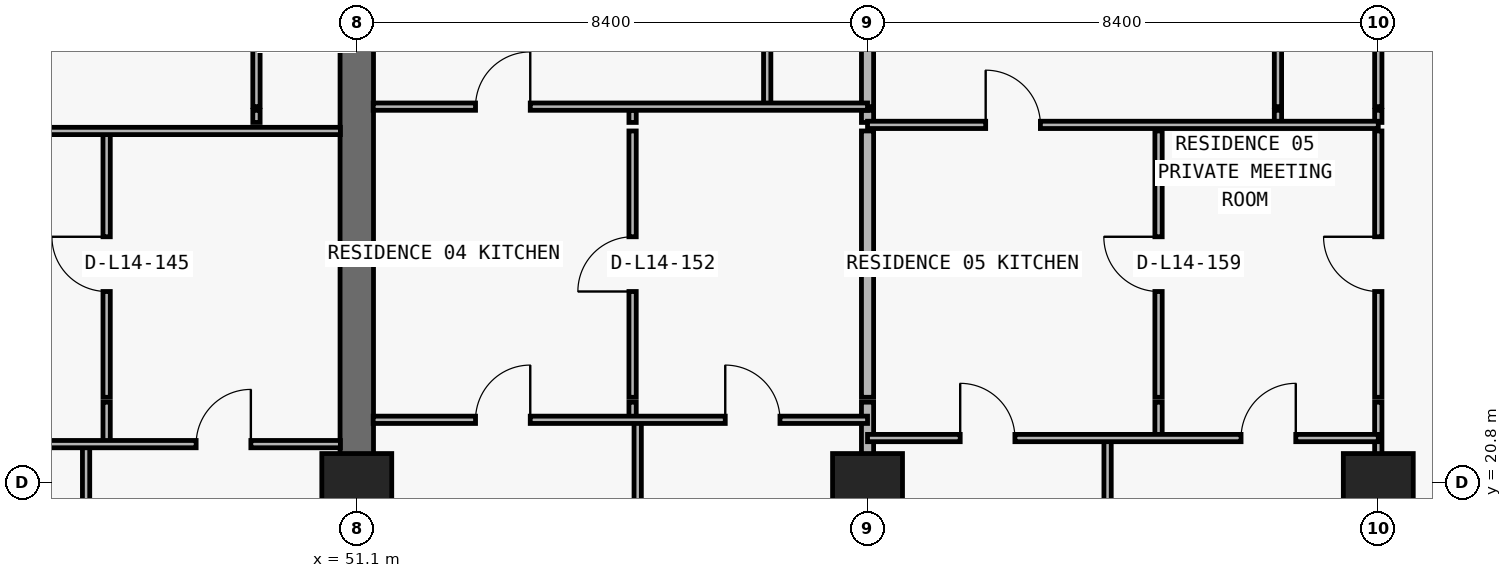
"""IFC4 building model, lengths in metres.
Left out: names, types, materials, properties, quantities, classifications, styles, units other than length and angle.
Written with IfcOpenShell. Run it as: python <this file> out.ifc"""

import sys

from ifc_helpers import new_model, si_unit, direction, frame, frame_2d, origin, origin_2d, place, context, subcontext, project, spatial, rectangle, extrude, element, fill, save


model = new_model("IFC4")
c1 = context("Model", 3, precision=1e-05, world=origin(), true_north=direction((0.0, 1.0)))
c2 = subcontext(c1, "Body", "Model", "MODEL_VIEW")
j1 = project(units=[si_unit("LENGTHUNIT", "METRE"), si_unit("PLANEANGLEUNIT", "RADIAN")], contexts=[c1])
p1 = place(None, origin())
s1 = spatial("IfcSite", under=j1, at=p1, CompositionType="ELEMENT")
p2 = place(p1, origin())
s2 = spatial("IfcBuilding", under=s1, at=p2, CompositionType="ELEMENT")
p3 = place(p2, frame((0.0, 0.0, 56.4)))
s3 = spatial("IfcBuildingStorey", under=s2, at=p3, CompositionType="ELEMENT", Elevation=56.4)
for number, where, z_axis, x_axis in (
    (1, (51.1, 20.8, 0.0), (0.0, 0.0, 1.0), (1.0, 0.0, 0.0)),
    (2, (59.5, 20.8, 0.0), (0.0, 0.0, 1.0), (1.0, 0.0, 0.0)),
    (3, (67.9, 20.8, 0.0), (0.0, 0.0, 1.0), (1.0, 0.0, 0.0)),
):
    element("IfcColumn", number, at=place(p3, frame(where, z_axis=z_axis, x_axis=x_axis)), inside=s3, PredefinedType="COLUMN", context=c2, shape_type="SweptSolid", body=[
        extrude(rectangle(XDim=1.15, YDim=0.95, at=origin_2d()), origin(), (0.0, 0.0, 1.0), 3.05),
    ])
p4 = place(p3, frame((51.1, 20.8, 0.0), z_axis=(0.0, 0.0, 1.0), x_axis=(0.0, 1.0, 0.0)))
e4 = element("IfcWall", 4, at=p4, inside=s3, PredefinedType="SHEAR", context=c2, shape_type="SweptSolid", body=[
    extrude(rectangle(XDim=8.6, YDim=0.55, at=frame_2d((4.3, 0.0))), origin(), (0.0, 0.0, 1.0), 3.05),
])
p5 = place(p3, frame((46.648, 6.24, 0.0), z_axis=(0.0, 0.0, 1.0), x_axis=(0.0, 1.0, 0.0)))
e5 = element("IfcWall", 5, at=p5, inside=s3, PredefinedType="PARTITIONING", context=c2, shape_type="SweptSolid", body=[
    extrude(rectangle(XDim=15.19, YDim=0.12, at=frame_2d((7.595, 0.0))), origin(), (0.0, 0.0, 1.0), 3.05),
])
p6 = place(p3, frame((46.986, 21.43, 0.0), z_axis=(0.0, 0.0, 1.0), x_axis=(0.0, 1.0, 0.0)))
e6 = element("IfcWall", 6, at=p6, inside=s3, PredefinedType="PARTITIONING", context=c2, shape_type="SweptSolid", body=[
    extrude(rectangle(XDim=0.69, YDim=0.12, at=frame_2d((0.345, 0.0))), origin(), (0.0, 0.0, 1.0), 3.05),
])
p7 = place(p3, frame((46.986, 22.2, 0.0), z_axis=(0.0, 0.0, 1.0), x_axis=(0.0, 1.0, 0.0)))
e7 = element("IfcWall", 7, at=p7, inside=s3, PredefinedType="PARTITIONING", context=c2, shape_type="SweptSolid", body=[
    extrude(rectangle(XDim=4.38, YDim=0.12, at=frame_2d((2.19, 0.0))), origin(), (0.0, 0.0, 1.0), 3.05),
])
p8 = place(p7, frame((1.74, 0.0, 0.0)))
e8 = element("IfcOpeningElement", 8, at=p8, cuts=e7, PredefinedType="OPENING", context=c2, shape_type="SweptSolid", body=[
    extrude(rectangle(XDim=0.9, YDim=2.15, at=frame_2d((0.45, 1.075))), frame((0.0, 0.07, 0.0), z_axis=(0.0, -1.0, 0.0), x_axis=(1.0, 0.0, 0.0)), (0.0, 0.0, 1.0), 0.14),
])
p9 = place(p3, frame((49.45, 26.72, 0.0), z_axis=(0.0, 0.0, 1.0), x_axis=(0.0, 1.0, 0.0)))
e9 = element("IfcWall", 9, at=p9, inside=s3, PredefinedType="PARTITIONING", context=c2, shape_type="SweptSolid", body=[
    extrude(rectangle(XDim=0.2, YDim=0.12, at=frame_2d((0.1, 0.0))), origin(), (0.0, 0.0, 1.0), 3.05),
])
p10 = place(p3, frame((49.45, 26.98, 0.0), z_axis=(0.0, 0.0, 1.0), x_axis=(0.0, 1.0, 0.0)))
e10 = element("IfcWall", 10, at=p10, inside=s3, PredefinedType="PARTITIONING", context=c2, shape_type="SweptSolid", body=[
    extrude(rectangle(XDim=6.82, YDim=0.12, at=frame_2d((3.41, 0.0))), origin(), (0.0, 0.0, 1.0), 3.05),
])
p11 = place(p10, frame((3.435, 0.0, 0.0)))
e11 = element("IfcOpeningElement", 11, at=p11, cuts=e10, PredefinedType="OPENING", context=c2, shape_type="SweptSolid", body=[
    extrude(rectangle(XDim=0.85, YDim=2.1, at=frame_2d((0.425, 1.05))), frame((0.0, 0.07, 0.0), z_axis=(0.0, -1.0, 0.0), x_axis=(1.0, 0.0, 0.0)), (0.0, 0.0, 1.0), 0.14),
])
p12 = place(p3, frame((51.1, 6.24, 0.0), z_axis=(0.0, 0.0, 1.0), x_axis=(0.0, 1.0, 0.0)))
e12 = element("IfcWall", 12, at=p12, inside=s3, PredefinedType="PARTITIONING", context=c2, shape_type="SweptSolid", body=[
    extrude(rectangle(XDim=14.555, YDim=0.2, at=frame_2d((7.277, 0.0))), origin(), (0.0, 0.0, 1.0), 2.11),
])
p13 = place(p3, frame((55.636, 21.83, 0.0), z_axis=(0.0, 0.0, 1.0), x_axis=(0.0, 1.0, 0.0)))
e13 = element("IfcWall", 13, at=p13, inside=s3, PredefinedType="PARTITIONING", context=c2, shape_type="SweptSolid", body=[
    extrude(rectangle(XDim=0.29, YDim=0.12, at=frame_2d((0.145, 0.0))), origin(), (0.0, 0.0, 1.0), 3.05),
])
p14 = place(p3, frame((55.636, 22.2, 0.0), z_axis=(0.0, 0.0, 1.0), x_axis=(0.0, 1.0, 0.0)))
e14 = element("IfcWall", 14, at=p14, inside=s3, PredefinedType="PARTITIONING", context=c2, shape_type="SweptSolid", body=[
    extrude(rectangle(XDim=4.38, YDim=0.12, at=frame_2d((2.19, 0.0))), origin(), (0.0, 0.0, 1.0), 3.05),
])
p15 = place(p14, frame((1.74, 0.0, 0.0)))
e15 = element("IfcOpeningElement", 15, at=p15, cuts=e14, PredefinedType="OPENING", context=c2, shape_type="SweptSolid", body=[
    extrude(rectangle(XDim=0.9, YDim=2.15, at=frame_2d((0.45, 1.075))), frame((0.0, 0.07, 0.0), z_axis=(0.0, -1.0, 0.0), x_axis=(1.0, 0.0, 0.0)), (0.0, 0.0, 1.0), 0.14),
])
p16 = place(p3, frame((55.636, 26.72, 0.0), z_axis=(0.0, 0.0, 1.0), x_axis=(0.0, 1.0, 0.0)))
e16 = element("IfcWall", 16, at=p16, inside=s3, PredefinedType="PARTITIONING", context=c2, shape_type="SweptSolid", body=[
    extrude(rectangle(XDim=0.2, YDim=0.12, at=frame_2d((0.1, 0.0))), origin(), (0.0, 0.0, 1.0), 3.05),
])
p17 = place(p3, frame((55.72, 6.24, 0.0), z_axis=(0.0, 0.0, 1.0), x_axis=(0.0, 1.0, 0.0)))
e17 = element("IfcWall", 17, at=p17, inside=s3, PredefinedType="PARTITIONING", context=c2, shape_type="SweptSolid", body=[
    extrude(rectangle(XDim=15.585, YDim=0.12, at=frame_2d((7.792, 0.0))), origin(), (0.0, 0.0, 1.0), 3.05),
])
p18 = place(p3, frame((57.85, 26.98, 0.0), z_axis=(0.0, 0.0, 1.0), x_axis=(0.0, 1.0, 0.0)))
e18 = element("IfcWall", 18, at=p18, inside=s3, PredefinedType="PARTITIONING", context=c2, shape_type="SweptSolid", body=[
    extrude(rectangle(XDim=6.82, YDim=0.12, at=frame_2d((3.41, 0.0))), origin(), (0.0, 0.0, 1.0), 3.05),
])
p19 = place(p18, frame((3.435, 0.0, 0.0)))
e19 = element("IfcOpeningElement", 19, at=p19, cuts=e18, PredefinedType="OPENING", context=c2, shape_type="SweptSolid", body=[
    extrude(rectangle(XDim=0.85, YDim=2.1, at=frame_2d((0.425, 1.05))), frame((0.0, 0.07, 0.0), z_axis=(0.0, -1.0, 0.0), x_axis=(1.0, 0.0, 0.0)), (0.0, 0.0, 1.0), 0.14),
])
p20 = place(p3, frame((59.5, 6.24, 0.0), z_axis=(0.0, 0.0, 1.0), x_axis=(0.0, 1.0, 0.0)))
e20 = element("IfcWall", 20, at=p20, inside=s3, PredefinedType="PARTITIONING", context=c2, shape_type="SweptSolid", body=[
    extrude(rectangle(XDim=15.88, YDim=0.2, at=frame_2d((7.94, 0.0))), origin(), (0.0, 0.0, 1.0), 2.11),
])
p21 = place(p3, frame((59.5, 22.2, 0.0), z_axis=(0.0, 0.0, 1.0), x_axis=(0.0, 1.0, 0.0)))
e21 = element("IfcWall", 21, at=p21, inside=s3, PredefinedType="PARTITIONING", context=c2, shape_type="SweptSolid", body=[
    extrude(rectangle(XDim=4.38, YDim=0.2, at=frame_2d((2.19, 0.0))), origin(), (0.0, 0.0, 1.0), 2.11),
])
p22 = place(p3, frame((59.5, 26.72, 0.0), z_axis=(0.0, 0.0, 1.0), x_axis=(0.0, 1.0, 0.0)))
e22 = element("IfcWall", 22, at=p22, inside=s3, PredefinedType="PARTITIONING", context=c2, shape_type="SweptSolid", body=[
    extrude(rectangle(XDim=0.2, YDim=0.2, at=frame_2d((0.1, 0.0))), origin(), (0.0, 0.0, 1.0), 2.11),
])
p23 = place(p3, frame((59.5, 26.98, 0.0), z_axis=(0.0, 0.0, 1.0), x_axis=(0.0, 1.0, 0.0)))
e23 = element("IfcWall", 23, at=p23, inside=s3, PredefinedType="PARTITIONING", context=c2, shape_type="SweptSolid", body=[
    extrude(rectangle(XDim=6.82, YDim=0.2, at=frame_2d((3.41, 0.0))), origin(), (0.0, 0.0, 1.0), 2.11),
])
p24 = place(p3, frame((63.448, 6.24, 0.0), z_axis=(0.0, 0.0, 1.0), x_axis=(0.0, 1.0, 0.0)))
e24 = element("IfcWall", 24, at=p24, inside=s3, PredefinedType="PARTITIONING", context=c2, shape_type="SweptSolid", body=[
    extrude(rectangle(XDim=15.29, YDim=0.12, at=frame_2d((7.645, 0.0))), origin(), (0.0, 0.0, 1.0), 3.05),
])
p25 = place(p3, frame((64.286, 21.53, 0.0), z_axis=(0.0, 0.0, 1.0), x_axis=(0.0, 1.0, 0.0)))
e25 = element("IfcWall", 25, at=p25, inside=s3, PredefinedType="PARTITIONING", context=c2, shape_type="SweptSolid", body=[
    extrude(rectangle(XDim=0.59, YDim=0.12, at=frame_2d((0.295, 0.0))), origin(), (0.0, 0.0, 1.0), 3.05),
])
p26 = place(p3, frame((64.286, 22.2, 0.0), z_axis=(0.0, 0.0, 1.0), x_axis=(0.0, 1.0, 0.0)))
e26 = element("IfcWall", 26, at=p26, inside=s3, PredefinedType="PARTITIONING", context=c2, shape_type="SweptSolid", body=[
    extrude(rectangle(XDim=4.38, YDim=0.12, at=frame_2d((2.19, 0.0))), origin(), (0.0, 0.0, 1.0), 3.05),
])
p27 = place(p26, frame((1.74, 0.0, 0.0)))
e27 = element("IfcOpeningElement", 27, at=p27, cuts=e26, PredefinedType="OPENING", context=c2, shape_type="SweptSolid", body=[
    extrude(rectangle(XDim=0.9, YDim=2.15, at=frame_2d((0.45, 1.075))), frame((0.0, 0.07, 0.0), z_axis=(0.0, -1.0, 0.0), x_axis=(1.0, 0.0, 0.0)), (0.0, 0.0, 1.0), 0.14),
])
p28 = place(p3, frame((66.25, 26.72, 0.0), z_axis=(0.0, 0.0, 1.0), x_axis=(0.0, 1.0, 0.0)))
e28 = element("IfcWall", 28, at=p28, inside=s3, PredefinedType="PARTITIONING", context=c2, shape_type="SweptSolid", body=[
    extrude(rectangle(XDim=0.2, YDim=0.12, at=frame_2d((0.1, 0.0))), origin(), (0.0, 0.0, 1.0), 3.05),
])
p29 = place(p3, frame((66.25, 26.98, 0.0), z_axis=(0.0, 0.0, 1.0), x_axis=(0.0, 1.0, 0.0)))
e29 = element("IfcWall", 29, at=p29, inside=s3, PredefinedType="PARTITIONING", context=c2, shape_type="SweptSolid", body=[
    extrude(rectangle(XDim=6.82, YDim=0.12, at=frame_2d((3.41, 0.0))), origin(), (0.0, 0.0, 1.0), 3.05),
])
p30 = place(p29, frame((3.435, 0.0, 0.0)))
e30 = element("IfcOpeningElement", 30, at=p30, cuts=e29, PredefinedType="OPENING", context=c2, shape_type="SweptSolid", body=[
    extrude(rectangle(XDim=0.85, YDim=2.1, at=frame_2d((0.425, 1.05))), frame((0.0, 0.07, 0.0), z_axis=(0.0, -1.0, 0.0), x_axis=(1.0, 0.0, 0.0)), (0.0, 0.0, 1.0), 0.14),
])
p31 = place(p3, frame((67.9, 6.24, 0.0), z_axis=(0.0, 0.0, 1.0), x_axis=(0.0, 1.0, 0.0)))
e31 = element("IfcWall", 31, at=p31, inside=s3, PredefinedType="PARTITIONING", context=c2, shape_type="SweptSolid", body=[
    extrude(rectangle(XDim=15.88, YDim=0.12, at=frame_2d((7.94, 0.0))), origin(), (0.0, 0.0, 1.0), 2.11),
])
p32 = place(p3, frame((67.9, 22.2, 0.0), z_axis=(0.0, 0.0, 1.0), x_axis=(0.0, 1.0, 0.0)))
e32 = element("IfcWall", 32, at=p32, inside=s3, PredefinedType="PARTITIONING", context=c2, shape_type="SweptSolid", body=[
    extrude(rectangle(XDim=4.38, YDim=0.12, at=frame_2d((2.19, 0.0))), origin(), (0.0, 0.0, 1.0), 2.11),
])
p33 = place(p32, frame((1.74, 0.0, 0.0)))
e33 = element("IfcOpeningElement", 33, at=p33, cuts=e32, PredefinedType="OPENING", context=c2, shape_type="SweptSolid", body=[
    extrude(rectangle(XDim=0.9, YDim=2.06, at=frame_2d((0.45, 1.03))), frame((0.0, 0.07, 0.0), z_axis=(0.0, -1.0, 0.0), x_axis=(1.0, 0.0, 0.0)), (0.0, 0.0, 1.0), 0.14),
])
p34 = place(p3, frame((67.9, 26.72, 0.0), z_axis=(0.0, 0.0, 1.0), x_axis=(0.0, 1.0, 0.0)))
e34 = element("IfcWall", 34, at=p34, inside=s3, PredefinedType="PARTITIONING", context=c2, shape_type="SweptSolid", body=[
    extrude(rectangle(XDim=0.2, YDim=0.12, at=frame_2d((0.1, 0.0))), origin(), (0.0, 0.0, 1.0), 2.11),
])
p35 = place(p3, frame((67.9, 26.98, 0.0), z_axis=(0.0, 0.0, 1.0), x_axis=(0.0, 1.0, 0.0)))
e35 = element("IfcWall", 35, at=p35, inside=s3, PredefinedType="PARTITIONING", context=c2, shape_type="SweptSolid", body=[
    extrude(rectangle(XDim=6.82, YDim=0.12, at=frame_2d((3.41, 0.0))), origin(), (0.0, 0.0, 1.0), 2.11),
])
p36 = place(p3, frame((42.7, 21.43, 0.0), z_axis=(0.0, 0.0, 1.0), x_axis=(1.0, 0.0, 0.0)))
e36 = element("IfcWall", 36, at=p36, inside=s3, PredefinedType="PARTITIONING", context=c2, shape_type="SweptSolid", body=[
    extrude(rectangle(XDim=8.13, YDim=0.12, at=frame_2d((4.065, 0.0))), origin(), (0.0, 0.0, 1.0), 3.05),
])
p37 = place(p36, frame((1.524, 0.0, 0.0)))
e37 = element("IfcOpeningElement", 37, at=p37, cuts=e36, PredefinedType="OPENING", context=c2, shape_type="SweptSolid", body=[
    extrude(rectangle(XDim=0.9, YDim=2.15, at=frame_2d((0.45, 1.075))), frame((0.0, 0.07, 0.0), z_axis=(0.0, -1.0, 0.0), x_axis=(1.0, 0.0, 0.0)), (0.0, 0.0, 1.0), 0.14),
])
p38 = place(p36, frame((5.758, 0.0, 0.0)))
e38 = element("IfcOpeningElement", 38, at=p38, cuts=e36, PredefinedType="OPENING", context=c2, shape_type="SweptSolid", body=[
    extrude(rectangle(XDim=0.9, YDim=2.15, at=frame_2d((0.45, 1.075))), frame((0.0, 0.07, 0.0), z_axis=(0.0, -1.0, 0.0), x_axis=(1.0, 0.0, 0.0)), (0.0, 0.0, 1.0), 0.14),
])
p39 = place(p3, frame((59.5, 21.53, 0.0), z_axis=(0.0, 0.0, 1.0), x_axis=(1.0, 0.0, 0.0)))
e39 = element("IfcWall", 39, at=p39, inside=s3, PredefinedType="PARTITIONING", context=c2, shape_type="SweptSolid", body=[
    extrude(rectangle(XDim=8.4, YDim=0.12, at=frame_2d((4.2, 0.0))), origin(), (0.0, 0.0, 1.0), 3.05),
])
p40 = place(p39, frame((1.524, 0.0, 0.0)))
e40 = element("IfcOpeningElement", 40, at=p40, cuts=e39, PredefinedType="OPENING", context=c2, shape_type="SweptSolid", body=[
    extrude(rectangle(XDim=0.9, YDim=2.15, at=frame_2d((0.45, 1.075))), frame((0.0, 0.07, 0.0), z_axis=(0.0, -1.0, 0.0), x_axis=(1.0, 0.0, 0.0)), (0.0, 0.0, 1.0), 0.14),
])
p41 = place(p39, frame((6.143, 0.0, 0.0)))
e41 = element("IfcOpeningElement", 41, at=p41, cuts=e39, PredefinedType="OPENING", context=c2, shape_type="SweptSolid", body=[
    extrude(rectangle(XDim=0.9, YDim=2.15, at=frame_2d((0.45, 1.075))), frame((0.0, 0.07, 0.0), z_axis=(0.0, -1.0, 0.0), x_axis=(1.0, 0.0, 0.0)), (0.0, 0.0, 1.0), 0.14),
])
p42 = place(p3, frame((51.37, 21.83, 0.0), z_axis=(0.0, 0.0, 1.0), x_axis=(1.0, 0.0, 0.0)))
e42 = element("IfcWall", 42, at=p42, inside=s3, PredefinedType="PARTITIONING", context=c2, shape_type="SweptSolid", body=[
    extrude(rectangle(XDim=8.13, YDim=0.12, at=frame_2d((4.065, 0.0))), origin(), (0.0, 0.0, 1.0), 3.05),
])
p43 = place(p42, frame((1.683, 0.0, 0.0)))
e43 = element("IfcOpeningElement", 43, at=p43, cuts=e42, PredefinedType="OPENING", context=c2, shape_type="SweptSolid", body=[
    extrude(rectangle(XDim=0.9, YDim=2.15, at=frame_2d((0.45, 1.075))), frame((0.0, 0.07, 0.0), z_axis=(0.0, -1.0, 0.0), x_axis=(1.0, 0.0, 0.0)), (0.0, 0.0, 1.0), 0.14),
])
p44 = place(p42, frame((5.79, 0.0, 0.0)))
e44 = element("IfcOpeningElement", 44, at=p44, cuts=e42, PredefinedType="OPENING", context=c2, shape_type="SweptSolid", body=[
    extrude(rectangle(XDim=0.9, YDim=2.15, at=frame_2d((0.45, 1.075))), frame((0.0, 0.07, 0.0), z_axis=(0.0, -1.0, 0.0), x_axis=(1.0, 0.0, 0.0)), (0.0, 0.0, 1.0), 0.14),
])
p45 = place(p3, frame((42.7, 26.58, 0.0), z_axis=(0.0, 0.0, 1.0), x_axis=(1.0, 0.0, 0.0)))
e45 = element("IfcWall", 45, at=p45, inside=s3, PredefinedType="PARTITIONING", context=c2, shape_type="SweptSolid", body=[
    extrude(rectangle(XDim=8.13, YDim=0.12, at=frame_2d((4.065, 0.0))), origin(), (0.0, 0.0, 1.0), 3.05),
])
p46 = place(p45, frame((1.693, 0.0, 0.0)))
e46 = element("IfcOpeningElement", 46, at=p46, cuts=e45, PredefinedType="OPENING", context=c2, shape_type="SweptSolid", body=[
    extrude(rectangle(XDim=0.9, YDim=2.15, at=frame_2d((0.45, 1.075))), frame((0.0, 0.07, 0.0), z_axis=(0.0, -1.0, 0.0), x_axis=(1.0, 0.0, 0.0)), (0.0, 0.0, 1.0), 0.14),
])
p47 = place(p3, frame((59.5, 26.68, 0.0), z_axis=(0.0, 0.0, 1.0), x_axis=(1.0, 0.0, 0.0)))
e47 = element("IfcWall", 47, at=p47, inside=s3, PredefinedType="PARTITIONING", context=c2, shape_type="SweptSolid", body=[
    extrude(rectangle(XDim=8.4, YDim=0.12, at=frame_2d((4.2, 0.0))), origin(), (0.0, 0.0, 1.0), 3.05),
])
p48 = place(p47, frame((1.943, 0.0, 0.0)))
e48 = element("IfcOpeningElement", 48, at=p48, cuts=e47, PredefinedType="OPENING", context=c2, shape_type="SweptSolid", body=[
    extrude(rectangle(XDim=0.9, YDim=2.15, at=frame_2d((0.45, 1.075))), frame((0.0, 0.07, 0.0), z_axis=(0.0, -1.0, 0.0), x_axis=(1.0, 0.0, 0.0)), (0.0, 0.0, 1.0), 0.14),
])
p49 = place(p3, frame((51.37, 26.98, 0.0), z_axis=(0.0, 0.0, 1.0), x_axis=(1.0, 0.0, 0.0)))
e49 = element("IfcWall", 49, at=p49, inside=s3, PredefinedType="PARTITIONING", context=c2, shape_type="SweptSolid", body=[
    extrude(rectangle(XDim=8.13, YDim=0.12, at=frame_2d((4.065, 0.0))), origin(), (0.0, 0.0, 1.0), 3.05),
])
p50 = place(p49, frame((1.683, 0.0, 0.0)))
e50 = element("IfcOpeningElement", 50, at=p50, cuts=e49, PredefinedType="OPENING", context=c2, shape_type="SweptSolid", body=[
    extrude(rectangle(XDim=0.9, YDim=2.15, at=frame_2d((0.45, 1.075))), frame((0.0, 0.07, 0.0), z_axis=(0.0, -1.0, 0.0), x_axis=(1.0, 0.0, 0.0)), (0.0, 0.0, 1.0), 0.14),
])
p51 = place(p8, origin())
e51 = element("IfcDoor", 51, at=p51, inside=s3, OperationType="SINGLE_SWING_RIGHT", PredefinedType="DOOR", context=c2, shape_type="SweptSolid", body=[
    extrude(rectangle(XDim=0.9, YDim=2.15, at=frame_2d((0.45, 1.075))), frame((0.0, 0.025, 0.0), z_axis=(0.0, -1.0, 0.0), x_axis=(1.0, 0.0, 0.0)), (0.0, 0.0, 1.0), 0.05),
])
fill(e8, e51)
p52 = place(p38, origin())
e52 = element("IfcDoor", 52, at=p52, inside=s3, OperationType="SINGLE_SWING_RIGHT", PredefinedType="DOOR", context=c2, shape_type="SweptSolid", body=[
    extrude(rectangle(XDim=0.9, YDim=2.15, at=frame_2d((0.45, 1.075))), frame((0.0, 0.025, 0.0), z_axis=(0.0, -1.0, 0.0), x_axis=(1.0, 0.0, 0.0)), (0.0, 0.0, 1.0), 0.05),
])
fill(e38, e52)
p53 = place(p50, origin())
e53 = element("IfcDoor", 53, at=p53, inside=s3, OperationType="SINGLE_SWING_RIGHT", PredefinedType="DOOR", context=c2, shape_type="SweptSolid", body=[
    extrude(rectangle(XDim=0.9, YDim=2.15, at=frame_2d((0.45, 1.075))), frame((0.0, 0.025, 0.0), z_axis=(0.0, -1.0, 0.0), x_axis=(1.0, 0.0, 0.0)), (0.0, 0.0, 1.0), 0.05),
])
fill(e50, e53)
p54 = place(p15, origin())
e54 = element("IfcDoor", 54, at=p54, inside=s3, OperationType="SINGLE_SWING_LEFT", PredefinedType="DOOR", context=c2, shape_type="SweptSolid", body=[
    extrude(rectangle(XDim=0.9, YDim=2.15, at=frame_2d((0.45, 1.075))), frame((0.0, 0.025, 0.0), z_axis=(0.0, -1.0, 0.0), x_axis=(1.0, 0.0, 0.0)), (0.0, 0.0, 1.0), 0.05),
])
fill(e15, e54)
p55 = place(p43, origin())
e55 = element("IfcDoor", 55, at=p55, inside=s3, OperationType="SINGLE_SWING_RIGHT", PredefinedType="DOOR", context=c2, shape_type="SweptSolid", body=[
    extrude(rectangle(XDim=0.9, YDim=2.15, at=frame_2d((0.45, 1.075))), frame((0.0, 0.025, 0.0), z_axis=(0.0, -1.0, 0.0), x_axis=(1.0, 0.0, 0.0)), (0.0, 0.0, 1.0), 0.05),
])
fill(e43, e55)
p56 = place(p44, origin())
e56 = element("IfcDoor", 56, at=p56, inside=s3, OperationType="SINGLE_SWING_LEFT", PredefinedType="DOOR", context=c2, shape_type="SweptSolid", body=[
    extrude(rectangle(XDim=0.9, YDim=2.15, at=frame_2d((0.45, 1.075))), frame((0.0, 0.025, 0.0), z_axis=(0.0, -1.0, 0.0), x_axis=(1.0, 0.0, 0.0)), (0.0, 0.0, 1.0), 0.05),
])
fill(e44, e56)
p57 = place(p48, origin())
e57 = element("IfcDoor", 57, at=p57, inside=s3, OperationType="SINGLE_SWING_LEFT", PredefinedType="DOOR", context=c2, shape_type="SweptSolid", body=[
    extrude(rectangle(XDim=0.9, YDim=2.15, at=frame_2d((0.45, 1.075))), frame((0.0, 0.025, 0.0), z_axis=(0.0, -1.0, 0.0), x_axis=(1.0, 0.0, 0.0)), (0.0, 0.0, 1.0), 0.05),
])
fill(e48, e57)
p58 = place(p27, origin())
e58 = element("IfcDoor", 58, at=p58, inside=s3, OperationType="SINGLE_SWING_RIGHT", PredefinedType="DOOR", context=c2, shape_type="SweptSolid", body=[
    extrude(rectangle(XDim=0.9, YDim=2.15, at=frame_2d((0.45, 1.075))), frame((0.0, 0.025, 0.0), z_axis=(0.0, -1.0, 0.0), x_axis=(1.0, 0.0, 0.0)), (0.0, 0.0, 1.0), 0.05),
])
fill(e27, e58)
p59 = place(p40, origin())
e59 = element("IfcDoor", 59, at=p59, inside=s3, OperationType="SINGLE_SWING_LEFT", PredefinedType="DOOR", context=c2, shape_type="SweptSolid", body=[
    extrude(rectangle(XDim=0.9, YDim=2.15, at=frame_2d((0.45, 1.075))), frame((0.0, 0.025, 0.0), z_axis=(0.0, -1.0, 0.0), x_axis=(1.0, 0.0, 0.0)), (0.0, 0.0, 1.0), 0.05),
])
fill(e40, e59)
p60 = place(p41, origin())
e60 = element("IfcDoor", 60, at=p60, inside=s3, OperationType="SINGLE_SWING_RIGHT", PredefinedType="DOOR", context=c2, shape_type="SweptSolid", body=[
    extrude(rectangle(XDim=0.9, YDim=2.15, at=frame_2d((0.45, 1.075))), frame((0.0, 0.025, 0.0), z_axis=(0.0, -1.0, 0.0), x_axis=(1.0, 0.0, 0.0)), (0.0, 0.0, 1.0), 0.05),
])
fill(e41, e60)
p61 = place(p33, origin())
e61 = element("IfcDoor", 61, at=p61, inside=s3, OperationType="SINGLE_SWING_RIGHT", PredefinedType="DOOR", context=c2, shape_type="SweptSolid", body=[
    extrude(rectangle(XDim=0.9, YDim=2.06, at=frame_2d((0.45, 1.03))), frame((0.0, 0.025, 0.0), z_axis=(0.0, -1.0, 0.0), x_axis=(1.0, 0.0, 0.0)), (0.0, 0.0, 1.0), 0.05),
])
fill(e33, e61)
save(model, sys.argv[1])
